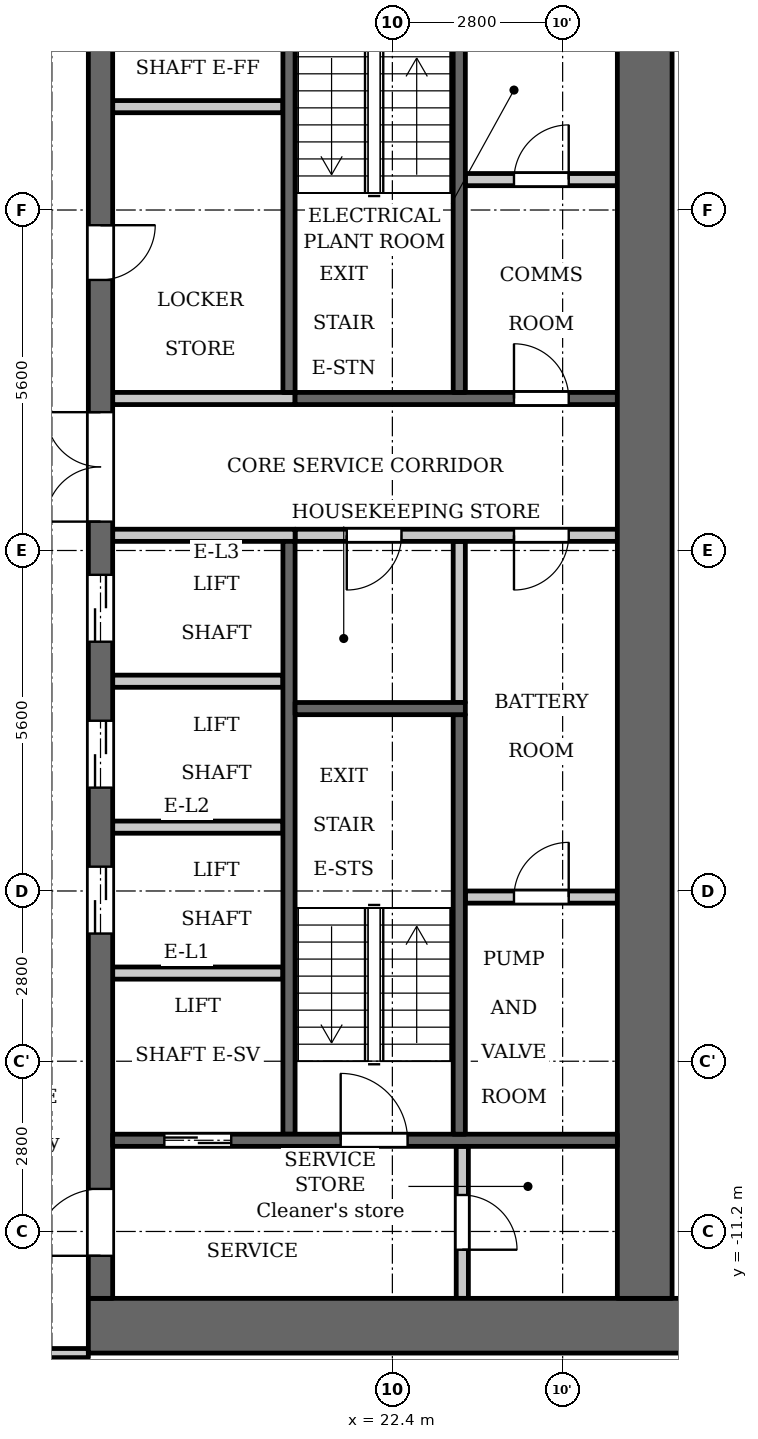
"""IFC4 building model, lengths in metres.
Left out: names, types, materials, properties, quantities, classifications, styles, units other than length and angle.
Written with IfcOpenShell. Run it as: python <this file> out.ifc"""

import sys

from ifc_helpers import new_model, si_unit, direction, frame, frame_2d, origin, place, context, subcontext, project, spatial, rectangle, extrude, element, fill, save


model = new_model("IFC4")
c1 = context("Model", 3, precision=1e-05, world=origin(), true_north=direction((0.0, 1.0)))
c2 = subcontext(c1, "Body", "Model", "MODEL_VIEW")
j1 = project(units=[si_unit("LENGTHUNIT", "METRE"), si_unit("PLANEANGLEUNIT", "RADIAN")], contexts=[c1])
p1 = place(None, origin())
s1 = spatial("IfcSite", under=j1, at=p1, CompositionType="ELEMENT")
p2 = place(p1, origin())
s2 = spatial("IfcBuilding", under=s1, at=p2, CompositionType="ELEMENT")
p3 = place(p2, frame((0.0, 0.0, 55.0)))
s3 = spatial("IfcBuildingStorey", under=s2, at=p3, CompositionType="ELEMENT", Elevation=55.0)
p4 = place(p3, frame((23.5, -2.5, 0.0), z_axis=(0.0, 0.0, 1.0), x_axis=(0.0, 1.0, 0.0)))
e1 = element("IfcWall", 1, at=p4, inside=s3, PredefinedType="PARTITIONING", context=c2, shape_type="SweptSolid", body=[
    extrude(rectangle(XDim=2.65, YDim=0.2, at=frame_2d((1.325, 0.0))), origin(), (0.0, 0.0, 1.0), 3.2),
])
p5 = place(p3, frame((20.7, 2.6, 0.0), z_axis=(0.0, 0.0, 1.0), x_axis=(0.0, 1.0, 0.0)))
e2 = element("IfcWall", 2, at=p5, inside=s3, PredefinedType="SHEAR", context=c2, shape_type="SweptSolid", body=[
    extrude(rectangle(XDim=7.0, YDim=0.2, at=frame_2d((3.5, 0.0))), origin(), (0.0, 0.0, 1.0), 3.2),
])
p6 = place(p3, frame((20.7, -9.6, 0.0), z_axis=(0.0, 0.0, 1.0), x_axis=(0.0, 1.0, 0.0)))
e3 = element("IfcWall", 3, at=p6, inside=s3, PredefinedType="SHEAR", context=c2, shape_type="SweptSolid", body=[
    extrude(rectangle(XDim=9.75, YDim=0.2, at=frame_2d((4.875, 0.0))), origin(), (0.0, 0.0, 1.0), 3.2),
])
p7 = place(p3, frame((20.8, 2.5, 0.0), z_axis=(0.0, 0.0, 1.0), x_axis=(1.0, 0.0, 0.0)))
e4 = element("IfcWall", 4, at=p7, inside=s3, PredefinedType="SHEAR", context=c2, shape_type="SweptSolid", body=[
    extrude(rectangle(XDim=5.3, YDim=0.2, at=frame_2d((2.65, 0.0))), origin(), (0.0, 0.0, 1.0), 3.2),
])
p8 = place(p7, frame((3.6, 0.0, 0.0)))
e5 = element("IfcOpeningElement", 5, at=p8, cuts=e4, PredefinedType="OPENING", context=c2, shape_type="SweptSolid", body=[
    extrude(rectangle(XDim=0.9, YDim=2.1, at=frame_2d((0.45, 1.05))), frame((0.0, 0.11, 0.0), z_axis=(0.0, -1.0, 0.0), x_axis=(1.0, 0.0, 0.0)), (0.0, 0.0, 1.0), 0.22),
])
p9 = place(p3, frame((20.8, 0.25, 0.0), z_axis=(0.0, 0.0, 1.0), x_axis=(1.0, 0.0, 0.0)))
e6 = element("IfcWall", 6, at=p9, inside=s3, PredefinedType="PARTITIONING", context=c2, shape_type="SweptSolid", body=[
    extrude(rectangle(XDim=5.3, YDim=0.2, at=frame_2d((2.65, 0.0))), origin(), (0.0, 0.0, 1.0), 3.2),
])
p10 = place(p9, frame((0.85, 0.0, 0.0)))
e7 = element("IfcOpeningElement", 7, at=p10, cuts=e6, PredefinedType="OPENING", context=c2, shape_type="SweptSolid", body=[
    extrude(rectangle(XDim=0.9, YDim=2.1, at=frame_2d((0.45, 1.05))), frame((0.0, 0.11, 0.0), z_axis=(0.0, -1.0, 0.0), x_axis=(1.0, 0.0, 0.0)), (0.0, 0.0, 1.0), 0.22),
])
p11 = place(p9, frame((3.6, 0.0, 0.0)))
e8 = element("IfcOpeningElement", 8, at=p11, cuts=e6, PredefinedType="OPENING", context=c2, shape_type="SweptSolid", body=[
    extrude(rectangle(XDim=0.9, YDim=2.1, at=frame_2d((0.45, 1.05))), frame((0.0, 0.11, 0.0), z_axis=(0.0, -1.0, 0.0), x_axis=(1.0, 0.0, 0.0)), (0.0, 0.0, 1.0), 0.22),
])
p12 = place(p3, frame((17.4, -12.75, 0.0), z_axis=(0.0, 0.0, 1.0), x_axis=(1.0, 0.0, 0.0)))
e9 = element("IfcWall", 9, at=p12, inside=s3, PredefinedType="SHEAR", context=c2, shape_type="SweptSolid", body=[
    extrude(rectangle(XDim=10.4, YDim=0.9, at=frame_2d((5.2, 0.0))), origin(), (0.0, 0.0, 1.0), 3.2),
])
p13 = place(p3, frame((17.6, -12.3, 0.0), z_axis=(0.0, 0.0, 1.0), x_axis=(0.0, 1.0, 0.0)))
e10 = element("IfcWall", 10, at=p13, inside=s3, PredefinedType="SHEAR", context=c2, shape_type="SweptSolid", body=[
    extrude(rectangle(XDim=24.6, YDim=0.4, at=frame_2d((12.3, 0.0))), origin(), (0.0, 0.0, 1.0), 3.2),
])
p14 = place(p13, frame((6.0, 0.0, 0.0)))
e11 = element("IfcOpeningElement", 11, at=p14, cuts=e10, PredefinedType="OPENING", context=c2, shape_type="SweptSolid", body=[
    extrude(rectangle(XDim=1.1, YDim=2.1, at=frame_2d((0.55, 1.05))), frame((0.0, 0.21, 0.0), z_axis=(0.0, -1.0, 0.0), x_axis=(1.0, 0.0, 0.0)), (0.0, 0.0, 1.0), 0.42),
])
p15 = place(p13, frame((8.4, 0.0, 0.0)))
e12 = element("IfcOpeningElement", 12, at=p15, cuts=e10, PredefinedType="OPENING", context=c2, shape_type="SweptSolid", body=[
    extrude(rectangle(XDim=1.1, YDim=2.1, at=frame_2d((0.55, 1.05))), frame((0.0, 0.21, 0.0), z_axis=(0.0, -1.0, 0.0), x_axis=(1.0, 0.0, 0.0)), (0.0, 0.0, 1.0), 0.42),
])
p16 = place(p13, frame((10.8, 0.0, 0.0)))
e13 = element("IfcOpeningElement", 13, at=p16, cuts=e10, PredefinedType="OPENING", context=c2, shape_type="SweptSolid", body=[
    extrude(rectangle(XDim=1.1, YDim=2.1, at=frame_2d((0.55, 1.05))), frame((0.0, 0.21, 0.0), z_axis=(0.0, -1.0, 0.0), x_axis=(1.0, 0.0, 0.0)), (0.0, 0.0, 1.0), 0.42),
])
p17 = place(p13, frame((16.75, 0.0, 0.0)))
e14 = element("IfcOpeningElement", 14, at=p17, cuts=e10, PredefinedType="OPENING", context=c2, shape_type="SweptSolid", body=[
    extrude(rectangle(XDim=0.9, YDim=2.1, at=frame_2d((0.45, 1.05))), frame((0.0, 0.21, 0.0), z_axis=(0.0, -1.0, 0.0), x_axis=(1.0, 0.0, 0.0)), (0.0, 0.0, 1.0), 0.42),
])
p18 = place(p13, frame((22.8, 0.0, 0.0)))
e15 = element("IfcOpeningElement", 15, at=p18, cuts=e10, PredefinedType="OPENING", context=c2, shape_type="SweptSolid", body=[
    extrude(rectangle(XDim=1.1, YDim=2.1, at=frame_2d((0.55, 1.05))), frame((0.0, 0.21, 0.0), z_axis=(0.0, -1.0, 0.0), x_axis=(1.0, 0.0, 0.0)), (0.0, 0.0, 1.0), 0.42),
])
p19 = place(p13, frame((0.7, 0.0, 0.0)))
e16 = element("IfcOpeningElement", 16, at=p19, cuts=e10, PredefinedType="OPENING", context=c2, shape_type="SweptSolid", body=[
    extrude(rectangle(XDim=1.1, YDim=2.1, at=frame_2d((0.55, 1.05))), frame((0.0, 0.21, 0.0), z_axis=(0.0, -1.0, 0.0), x_axis=(1.0, 0.0, 0.0)), (0.0, 0.0, 1.0), 0.42),
])
p20 = place(p13, frame((12.775, 0.0, 0.0)))
e17 = element("IfcOpeningElement", 17, at=p20, cuts=e10, PredefinedType="OPENING", context=c2, shape_type="SweptSolid", body=[
    extrude(rectangle(XDim=1.8, YDim=2.1, at=frame_2d((0.9, 1.05))), frame((0.0, 0.21, 0.0), z_axis=(0.0, -1.0, 0.0), x_axis=(1.0, 0.0, 0.0)), (0.0, 0.0, 1.0), 0.42),
])
p21 = place(p3, frame((26.55, -12.3, 0.0), z_axis=(0.0, 0.0, 1.0), x_axis=(0.0, 1.0, 0.0)))
e18 = element("IfcWall", 18, at=p21, inside=s3, PredefinedType="SHEAR", context=c2, shape_type="SweptSolid", body=[
    extrude(rectangle(XDim=24.6, YDim=0.9, at=frame_2d((12.3, 0.0))), origin(), (0.0, 0.0, 1.0), 3.2),
])
p22 = place(p3, frame((23.55, -12.3, 0.0), z_axis=(0.0, 0.0, 1.0), x_axis=(0.0, 1.0, 0.0)))
e19 = element("IfcWall", 19, at=p22, inside=s3, PredefinedType="PARTITIONING", context=c2, shape_type="SweptSolid", body=[
    extrude(rectangle(XDim=2.5, YDim=0.2, at=frame_2d((1.25, 0.0))), origin(), (0.0, 0.0, 1.0), 3.2),
])
p23 = place(p22, frame((0.8, 0.0, 0.0)))
e20 = element("IfcOpeningElement", 20, at=p23, cuts=e19, PredefinedType="OPENING", context=c2, shape_type="SweptSolid", body=[
    extrude(rectangle(XDim=0.9, YDim=2.1, at=frame_2d((0.45, 1.05))), frame((0.0, 0.11, 0.0), z_axis=(0.0, -1.0, 0.0), x_axis=(1.0, 0.0, 0.0)), (0.0, 0.0, 1.0), 0.22),
])
p24 = place(p3, frame((23.6, -5.7, 0.0), z_axis=(0.0, 0.0, 1.0), x_axis=(1.0, 0.0, 0.0)))
e21 = element("IfcWall", 21, at=p24, inside=s3, PredefinedType="PARTITIONING", context=c2, shape_type="SweptSolid", body=[
    extrude(rectangle(XDim=2.5, YDim=0.2, at=frame_2d((1.25, 0.0))), origin(), (0.0, 0.0, 1.0), 3.2),
])
p25 = place(p24, frame((0.8, 0.0, 0.0)))
e22 = element("IfcOpeningElement", 22, at=p25, cuts=e21, PredefinedType="OPENING", context=c2, shape_type="SweptSolid", body=[
    extrude(rectangle(XDim=0.9, YDim=2.1, at=frame_2d((0.45, 1.05))), frame((0.0, 0.11, 0.0), z_axis=(0.0, -1.0, 0.0), x_axis=(1.0, 0.0, 0.0)), (0.0, 0.0, 1.0), 0.22),
])
p26 = place(p3, frame((23.6, 6.1, 0.0), z_axis=(0.0, 0.0, 1.0), x_axis=(1.0, 0.0, 0.0)))
e23 = element("IfcWall", 23, at=p26, inside=s3, PredefinedType="PARTITIONING", context=c2, shape_type="SweptSolid", body=[
    extrude(rectangle(XDim=2.5, YDim=0.2, at=frame_2d((1.25, 0.0))), origin(), (0.0, 0.0, 1.0), 3.2),
])
p27 = place(p26, frame((0.8, 0.0, 0.0)))
e24 = element("IfcOpeningElement", 24, at=p27, cuts=e23, PredefinedType="OPENING", context=c2, shape_type="SweptSolid", body=[
    extrude(rectangle(XDim=0.9, YDim=2.1, at=frame_2d((0.45, 1.05))), frame((0.0, 0.11, 0.0), z_axis=(0.0, -1.0, 0.0), x_axis=(1.0, 0.0, 0.0)), (0.0, 0.0, 1.0), 0.22),
])
p28 = place(p3, frame((17.8, -9.7, 0.0), z_axis=(0.0, 0.0, 1.0), x_axis=(1.0, 0.0, 0.0)))
e25 = element("IfcWall", 25, at=p28, inside=s3, PredefinedType="SHEAR", context=c2, shape_type="SweptSolid", body=[
    extrude(rectangle(XDim=8.3, YDim=0.2, at=frame_2d((4.15, 0.0))), origin(), (0.0, 0.0, 1.0), 3.2),
])
p29 = place(p28, frame((0.85, 0.0, 0.0)))
e26 = element("IfcOpeningElement", 26, at=p29, cuts=e25, PredefinedType="OPENING", context=c2, shape_type="SweptSolid", body=[
    extrude(rectangle(XDim=1.1, YDim=2.1, at=frame_2d((0.55, 1.05))), frame((0.0, 0.11, 0.0), z_axis=(0.0, -1.0, 0.0), x_axis=(1.0, 0.0, 0.0)), (0.0, 0.0, 1.0), 0.22),
])
p30 = place(p28, frame((3.75, 0.0, 0.0)))
e27 = element("IfcOpeningElement", 27, at=p30, cuts=e25, PredefinedType="OPENING", context=c2, shape_type="SweptSolid", body=[
    extrude(rectangle(XDim=1.1, YDim=2.1, at=frame_2d((0.55, 1.05))), frame((0.0, 0.11, 0.0), z_axis=(0.0, -1.0, 0.0), x_axis=(1.0, 0.0, 0.0)), (0.0, 0.0, 1.0), 0.22),
])
for number, where, z_axis, x_axis in (
    (28, (17.8, -6.95, 0.0), (0.0, 0.0, 1.0), (1.0, 0.0, 0.0)),
    (29, (17.8, -4.55, 0.0), (0.0, 0.0, 1.0), (1.0, 0.0, 0.0)),
    (30, (17.8, -2.15, 0.0), (0.0, 0.0, 1.0), (1.0, 0.0, 0.0)),
):
    element("IfcWall", number, at=place(p3, frame(where, z_axis=z_axis, x_axis=x_axis)), inside=s3, PredefinedType="PARTITIONING", context=c2, shape_type="SweptSolid", body=[
        extrude(rectangle(XDim=2.8, YDim=0.2, at=frame_2d((1.4, 0.0))), origin(), (0.0, 0.0, 1.0), 3.2),
    ])
for number, where, z_axis, x_axis in (
    (31, (17.8, 0.25, 0.0), (0.0, 0.0, 1.0), (1.0, 0.0, 0.0)),
    (32, (17.8, 2.5, 0.0), (0.0, 0.0, 1.0), (1.0, 0.0, 0.0)),
):
    element("IfcWall", number, at=place(p3, frame(where, z_axis=z_axis, x_axis=x_axis)), inside=s3, PredefinedType="PARTITIONING", context=c2, shape_type="SweptSolid", body=[
        extrude(rectangle(XDim=3.0, YDim=0.2, at=frame_2d((1.5, 0.0))), origin(), (0.0, 0.0, 1.0), 3.2),
    ])
p31 = place(p3, frame((17.8, 7.3, 0.0), z_axis=(0.0, 0.0, 1.0), x_axis=(1.0, 0.0, 0.0)))
e33 = element("IfcWall", 33, at=p31, inside=s3, PredefinedType="PARTITIONING", context=c2, shape_type="SweptSolid", body=[
    extrude(rectangle(XDim=2.8, YDim=0.2, at=frame_2d((1.4, 0.0))), origin(), (0.0, 0.0, 1.0), 3.2),
])
p32 = place(p3, frame((23.5, 2.6, 0.0), z_axis=(0.0, 0.0, 1.0), x_axis=(0.0, 1.0, 0.0)))
e34 = element("IfcWall", 34, at=p32, inside=s3, PredefinedType="SHEAR", context=c2, shape_type="SweptSolid", body=[
    extrude(rectangle(XDim=7.0, YDim=0.2, at=frame_2d((3.5, 0.0))), origin(), (0.0, 0.0, 1.0), 3.2),
])
p33 = place(p3, frame((23.5, -9.6, 0.0), z_axis=(0.0, 0.0, 1.0), x_axis=(0.0, 1.0, 0.0)))
e35 = element("IfcWall", 35, at=p33, inside=s3, PredefinedType="SHEAR", context=c2, shape_type="SweptSolid", body=[
    extrude(rectangle(XDim=6.9, YDim=0.2, at=frame_2d((3.45, 0.0))), origin(), (0.0, 0.0, 1.0), 3.2),
])
p34 = place(p3, frame((20.8, -2.6, 0.0), z_axis=(0.0, 0.0, 1.0), x_axis=(1.0, 0.0, 0.0)))
e36 = element("IfcWall", 36, at=p34, inside=s3, PredefinedType="SHEAR", context=c2, shape_type="SweptSolid", body=[
    extrude(rectangle(XDim=2.8, YDim=0.2, at=frame_2d((1.4, 0.0))), origin(), (0.0, 0.0, 1.0), 3.2),
])
p35 = place(p3, frame((-17.4, -13.2, 0.0), z_axis=(0.0, 0.0, 1.0), x_axis=(1.0, 0.0, 0.0)))
e37 = element("IfcWall", 37, at=p35, inside=s3, PredefinedType="PARTITIONING", context=c2, shape_type="SweptSolid", body=[
    extrude(rectangle(XDim=34.8, YDim=0.15, at=frame_2d((17.4, 0.0))), origin(), (0.0, 0.0, 1.0), 3.2),
])
p36 = place(p35, frame((0.65, 0.0, 0.0)))
e38 = element("IfcOpeningElement", 38, at=p36, cuts=e37, PredefinedType="OPENING", context=c2, shape_type="SweptSolid", body=[
    extrude(rectangle(XDim=1.0, YDim=2.1, at=frame_2d((0.5, 1.05))), frame((0.0, 0.085, 0.0), z_axis=(0.0, -1.0, 0.0), x_axis=(1.0, 0.0, 0.0)), (0.0, 0.0, 1.0), 0.17),
])
p37 = place(p35, frame((33.05, 0.0, 0.0)))
e39 = element("IfcOpeningElement", 39, at=p37, cuts=e37, PredefinedType="OPENING", context=c2, shape_type="SweptSolid", body=[
    extrude(rectangle(XDim=1.0, YDim=2.1, at=frame_2d((0.5, 1.05))), frame((0.0, 0.085, 0.0), z_axis=(0.0, -1.0, 0.0), x_axis=(1.0, 0.0, 0.0)), (0.0, 0.0, 1.0), 0.17),
])
p38 = place(p35, frame((10.15, 0.0, 0.0)))
e40 = element("IfcOpeningElement", 40, at=p38, cuts=e37, PredefinedType="OPENING", context=c2, shape_type="SweptSolid", body=[
    extrude(rectangle(XDim=1.0, YDim=2.1, at=frame_2d((0.5, 1.05))), frame((0.0, 0.085, 0.0), z_axis=(0.0, -1.0, 0.0), x_axis=(1.0, 0.0, 0.0)), (0.0, 0.0, 1.0), 0.17),
])
p39 = place(p35, frame((21.35, 0.0, 0.0)))
e41 = element("IfcOpeningElement", 41, at=p39, cuts=e37, PredefinedType="OPENING", context=c2, shape_type="SweptSolid", body=[
    extrude(rectangle(XDim=1.0, YDim=2.1, at=frame_2d((0.5, 1.05))), frame((0.0, 0.085, 0.0), z_axis=(0.0, -1.0, 0.0), x_axis=(1.0, 0.0, 0.0)), (0.0, 0.0, 1.0), 0.17),
])
p40 = place(p35, frame((30.75, 0.0, 0.0)))
e42 = element("IfcOpeningElement", 42, at=p40, cuts=e37, PredefinedType="OPENING", context=c2, shape_type="SweptSolid", body=[
    extrude(rectangle(XDim=1.0, YDim=2.1, at=frame_2d((0.5, 1.05))), frame((0.0, 0.085, 0.0), z_axis=(0.0, -1.0, 0.0), x_axis=(1.0, 0.0, 0.0)), (0.0, 0.0, 1.0), 0.17),
])
p41 = place(p29, origin())
e43 = element("IfcDoor", 43, at=p41, inside=s3, OperationType="DOUBLE_DOOR_SLIDING", PredefinedType="DOOR", context=c2, shape_type="SweptSolid", body=[
    extrude(rectangle(XDim=1.1, YDim=2.1, at=frame_2d((0.55, 1.05))), frame((0.0, 0.025, 0.0), z_axis=(0.0, -1.0, 0.0), x_axis=(1.0, 0.0, 0.0)), (0.0, 0.0, 1.0), 0.05),
])
fill(e26, e43)
p42 = place(p14, origin())
e44 = element("IfcDoor", 44, at=p42, inside=s3, OperationType="DOUBLE_DOOR_SLIDING", PredefinedType="DOOR", context=c2, shape_type="SweptSolid", body=[
    extrude(rectangle(XDim=1.1, YDim=2.1, at=frame_2d((0.55, 1.05))), frame((0.0, 0.025, 0.0), z_axis=(0.0, -1.0, 0.0), x_axis=(1.0, 0.0, 0.0)), (0.0, 0.0, 1.0), 0.05),
])
fill(e11, e44)
p43 = place(p15, origin())
e45 = element("IfcDoor", 45, at=p43, inside=s3, OperationType="DOUBLE_DOOR_SLIDING", PredefinedType="DOOR", context=c2, shape_type="SweptSolid", body=[
    extrude(rectangle(XDim=1.1, YDim=2.1, at=frame_2d((0.55, 1.05))), frame((0.0, 0.025, 0.0), z_axis=(0.0, -1.0, 0.0), x_axis=(1.0, 0.0, 0.0)), (0.0, 0.0, 1.0), 0.05),
])
fill(e12, e45)
p44 = place(p16, origin())
e46 = element("IfcDoor", 46, at=p44, inside=s3, OperationType="DOUBLE_DOOR_SLIDING", PredefinedType="DOOR", context=c2, shape_type="SweptSolid", body=[
    extrude(rectangle(XDim=1.1, YDim=2.1, at=frame_2d((0.55, 1.05))), frame((0.0, 0.025, 0.0), z_axis=(0.0, -1.0, 0.0), x_axis=(1.0, 0.0, 0.0)), (0.0, 0.0, 1.0), 0.05),
])
fill(e13, e46)
p45 = place(p17, origin())
e47 = element("IfcDoor", 47, at=p45, inside=s3, OperationType="SINGLE_SWING_RIGHT", PredefinedType="DOOR", context=c2, shape_type="SweptSolid", body=[
    extrude(rectangle(XDim=0.9, YDim=2.1, at=frame_2d((0.45, 1.05))), frame((0.0, 0.025, 0.0), z_axis=(0.0, -1.0, 0.0), x_axis=(1.0, 0.0, 0.0)), (0.0, 0.0, 1.0), 0.05),
])
fill(e14, e47)
p46 = place(p19, origin())
e48 = element("IfcDoor", 48, at=p46, inside=s3, OperationType="SINGLE_SWING_RIGHT", PredefinedType="DOOR", context=c2, shape_type="SweptSolid", body=[
    extrude(rectangle(XDim=1.1, YDim=2.1, at=frame_2d((0.55, 1.05))), frame((0.0, 0.025, 0.0), z_axis=(0.0, -1.0, 0.0), x_axis=(1.0, 0.0, 0.0)), (0.0, 0.0, 1.0), 0.05),
])
fill(e16, e48)
p47 = place(p23, origin())
e49 = element("IfcDoor", 49, at=p47, inside=s3, OperationType="SINGLE_SWING_LEFT", PredefinedType="DOOR", context=c2, shape_type="SweptSolid", body=[
    extrude(rectangle(XDim=0.9, YDim=2.1, at=frame_2d((0.45, 1.05))), frame((0.0, 0.025, 0.0), z_axis=(0.0, -1.0, 0.0), x_axis=(1.0, 0.0, 0.0)), (0.0, 0.0, 1.0), 0.05),
])
fill(e20, e49)
p48 = place(p30, origin())
e50 = element("IfcDoor", 50, at=p48, inside=s3, OperationType="SINGLE_SWING_RIGHT", PredefinedType="DOOR", context=c2, shape_type="SweptSolid", body=[
    extrude(rectangle(XDim=1.1, YDim=2.1, at=frame_2d((0.55, 1.05))), frame((0.0, 0.025, 0.0), z_axis=(0.0, -1.0, 0.0), x_axis=(1.0, 0.0, 0.0)), (0.0, 0.0, 1.0), 0.05),
])
fill(e27, e50)
p49 = place(p20, origin())
e51 = element("IfcDoor", 51, at=p49, inside=s3, OperationType="DOUBLE_DOOR_SINGLE_SWING", PredefinedType="DOOR", context=c2, shape_type="SweptSolid", body=[
    extrude(rectangle(XDim=1.8, YDim=2.1, at=frame_2d((0.9, 1.05))), frame((0.0, 0.025, 0.0), z_axis=(0.0, -1.0, 0.0), x_axis=(1.0, 0.0, 0.0)), (0.0, 0.0, 1.0), 0.05),
])
fill(e17, e51)
p50 = place(p10, origin())
e52 = element("IfcDoor", 52, at=p50, inside=s3, OperationType="SINGLE_SWING_LEFT", PredefinedType="DOOR", context=c2, shape_type="SweptSolid", body=[
    extrude(rectangle(XDim=0.9, YDim=2.1, at=frame_2d((0.45, 1.05))), frame((0.0, 0.025, 0.0), z_axis=(0.0, -1.0, 0.0), x_axis=(1.0, 0.0, 0.0)), (0.0, 0.0, 1.0), 0.05),
])
fill(e7, e52)
p51 = place(p25, origin())
e53 = element("IfcDoor", 53, at=p51, inside=s3, OperationType="SINGLE_SWING_LEFT", PredefinedType="DOOR", context=c2, shape_type="SweptSolid", body=[
    extrude(rectangle(XDim=0.9, YDim=2.1, at=frame_2d((0.45, 1.05))), frame((0.0, 0.025, 0.0), z_axis=(0.0, -1.0, 0.0), x_axis=(1.0, 0.0, 0.0)), (0.0, 0.0, 1.0), 0.05),
])
fill(e22, e53)
p52 = place(p11, origin())
e54 = element("IfcDoor", 54, at=p52, inside=s3, OperationType="SINGLE_SWING_LEFT", PredefinedType="DOOR", context=c2, shape_type="SweptSolid", body=[
    extrude(rectangle(XDim=0.9, YDim=2.1, at=frame_2d((0.45, 1.05))), frame((0.0, 0.025, 0.0), z_axis=(0.0, -1.0, 0.0), x_axis=(1.0, 0.0, 0.0)), (0.0, 0.0, 1.0), 0.05),
])
fill(e8, e54)
p53 = place(p27, origin())
e55 = element("IfcDoor", 55, at=p53, inside=s3, OperationType="SINGLE_SWING_LEFT", PredefinedType="DOOR", context=c2, shape_type="SweptSolid", body=[
    extrude(rectangle(XDim=0.9, YDim=2.1, at=frame_2d((0.45, 1.05))), frame((0.0, 0.025, 0.0), z_axis=(0.0, -1.0, 0.0), x_axis=(1.0, 0.0, 0.0)), (0.0, 0.0, 1.0), 0.05),
])
fill(e24, e55)
p54 = place(p8, origin())
e56 = element("IfcDoor", 56, at=p54, inside=s3, OperationType="SINGLE_SWING_RIGHT", PredefinedType="DOOR", context=c2, shape_type="SweptSolid", body=[
    extrude(rectangle(XDim=0.9, YDim=2.1, at=frame_2d((0.45, 1.05))), frame((0.0, 0.025, 0.0), z_axis=(0.0, -1.0, 0.0), x_axis=(1.0, 0.0, 0.0)), (0.0, 0.0, 1.0), 0.05),
])
fill(e5, e56)
save(model, sys.argv[1])
